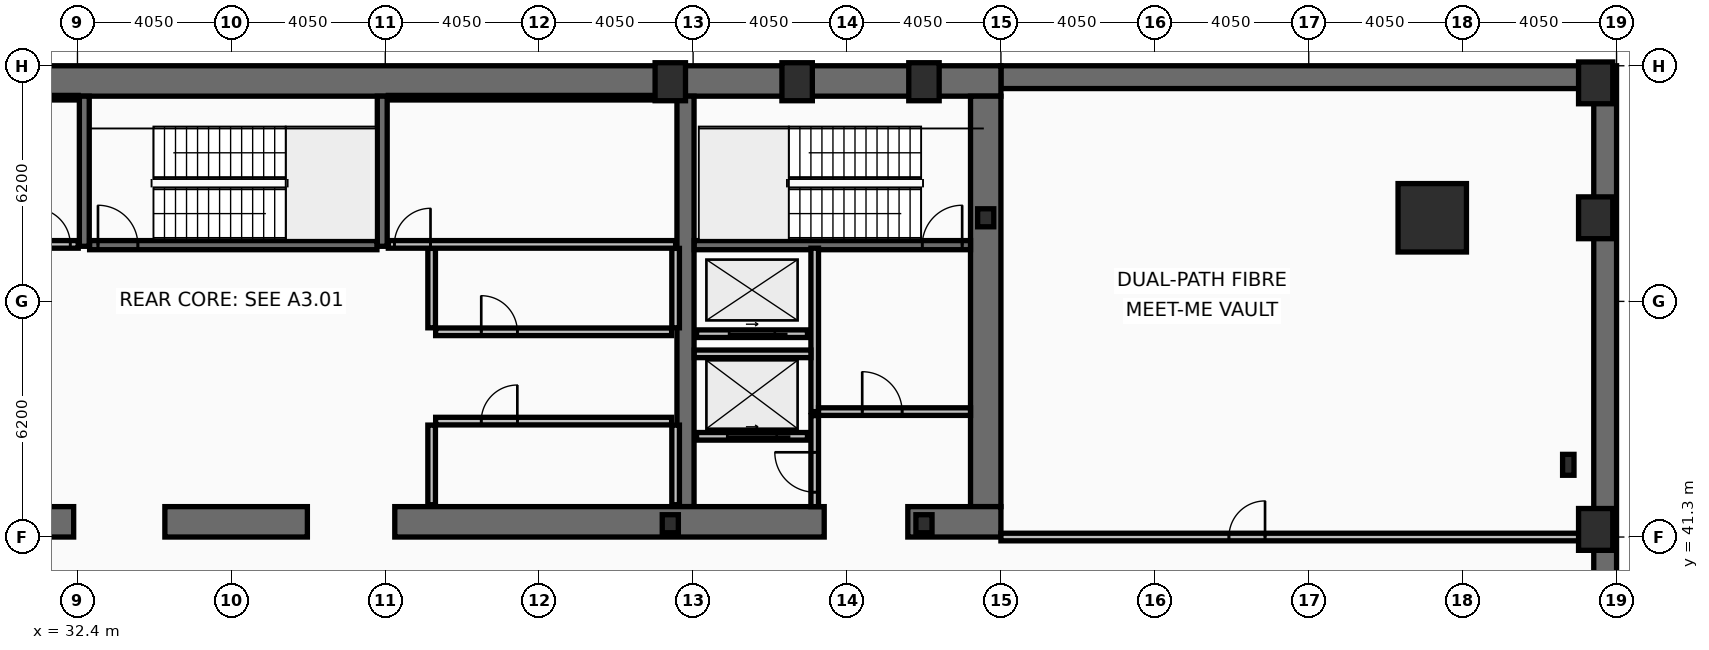
"""IFC4 building model, lengths in metres.
Left out: names, types, materials, properties, quantities, classifications, styles, units other than length and angle.
Written with IfcOpenShell. Run it as: python <this file> out.ifc"""

import sys

from ifc_helpers import new_model, si_unit, direction, frame, frame_2d, origin, origin_2d, place, context, subcontext, project, spatial, rectangle, hollow_rectangle, i_section, extrude, element, fill, save


model = new_model("IFC4")
c1 = context("Model", 3, precision=1e-05, world=origin(), true_north=direction((0.0, 1.0)))
c2 = subcontext(c1, "Body", "Model", "MODEL_VIEW")
j1 = project(units=[si_unit("LENGTHUNIT", "METRE"), si_unit("PLANEANGLEUNIT", "RADIAN")], contexts=[c1])
p1 = place(None, origin())
s1 = spatial("IfcSite", under=j1, at=p1, CompositionType="ELEMENT")
p2 = place(p1, origin())
s2 = spatial("IfcBuilding", under=s1, at=p2, CompositionType="ELEMENT")
p3 = place(p2, frame((0.0, 0.0, -9.0)))
s3 = spatial("IfcBuildingStorey", under=s2, at=p3, CompositionType="ELEMENT", Elevation=-9.0)
p4 = place(p3, frame((56.7, 53.4, -0.2), z_axis=(0.0, 0.0, 1.0), x_axis=(1.0, 0.0, 0.0)))
e1 = element("IfcWall", 1, at=p4, inside=s3, PredefinedType="SOLIDWALL", context=c2, shape_type="SweptSolid", body=[
    extrude(rectangle(XDim=15.6, YDim=0.6, at=frame_2d((7.8, 0.0))), origin(), (0.0, 0.0, 1.0), 4.48),
])
p5 = place(p3, frame((72.6, 53.7, -0.2), z_axis=(0.0, 0.0, 1.0), x_axis=(0.0, -1.0, 0.0)))
e2 = element("IfcWall", 2, at=p5, inside=s3, PredefinedType="SOLIDWALL", context=c2, shape_type="SweptSolid", body=[
    extrude(rectangle(XDim=53.7, YDim=0.6, at=frame_2d((26.85, 0.0))), origin(), (0.0, 0.0, 1.0), 4.48),
])
p6 = place(p3, frame((16.2, 53.3, -0.2), z_axis=(0.0, 0.0, 1.0), x_axis=(1.0, 0.0, 0.0)))
e3 = element("IfcWall", 3, at=p6, inside=s3, PredefinedType="SHEAR", context=c2, shape_type="SweptSolid", body=[
    extrude(rectangle(XDim=40.5, YDim=0.8, at=frame_2d((20.25, 0.0))), origin(), (0.0, 0.0, 1.0), 4.48),
])
p7 = place(p3, frame((56.3, 52.9, -0.2), z_axis=(0.0, 0.0, 1.0), x_axis=(0.0, -1.0, 0.0)))
e4 = element("IfcWall", 4, at=p7, inside=s3, PredefinedType="SHEAR", context=c2, shape_type="SweptSolid", body=[
    extrude(rectangle(XDim=10.8, YDim=0.8, at=frame_2d((5.4, 0.0))), origin(), (0.0, 0.0, 1.0), 4.48),
])
p8 = place(p3, frame((48.4, 42.1, -0.2), z_axis=(0.0, 0.0, 1.0), x_axis=(0.0, 1.0, 0.0)))
e5 = element("IfcWall", 5, at=p8, inside=s3, PredefinedType="SHEAR", context=c2, shape_type="SweptSolid", body=[
    extrude(rectangle(XDim=10.8, YDim=0.45, at=frame_2d((5.4, 0.0))), origin(), (0.0, 0.0, 1.0), 4.48),
])
p9 = place(p3, frame((32.3, 41.7, -0.2), z_axis=(0.0, 0.0, 1.0), x_axis=(-1.0, 0.0, 0.0)))
e6 = element("IfcWall", 6, at=p9, inside=s3, PredefinedType="SHEAR", context=c2, shape_type="SweptSolid", body=[
    extrude(rectangle(XDim=11.45, YDim=0.8, at=frame_2d((5.725, 0.0))), origin(), (0.0, 0.0, 1.0), 4.48),
])
p10 = place(p3, frame((38.45, 41.7, -0.2), z_axis=(0.0, 0.0, 1.0), x_axis=(-1.0, 0.0, 0.0)))
e7 = element("IfcWall", 7, at=p10, inside=s3, PredefinedType="SHEAR", context=c2, shape_type="SweptSolid", body=[
    extrude(rectangle(XDim=3.75, YDim=0.8, at=frame_2d((1.875, 0.0))), origin(), (0.0, 0.0, 1.0), 4.48),
])
p11 = place(p3, frame((52.05, 41.7, -0.2), z_axis=(0.0, 0.0, 1.0), x_axis=(-1.0, 0.0, 0.0)))
e8 = element("IfcWall", 8, at=p11, inside=s3, PredefinedType="SHEAR", context=c2, shape_type="SweptSolid", body=[
    extrude(rectangle(XDim=11.3, YDim=0.8, at=frame_2d((5.65, 0.0))), origin(), (0.0, 0.0, 1.0), 4.48),
])
p12 = place(p3, frame((56.7, 41.7, -0.2), z_axis=(0.0, 0.0, 1.0), x_axis=(-1.0, 0.0, 0.0)))
e9 = element("IfcWall", 9, at=p12, inside=s3, PredefinedType="SHEAR", context=c2, shape_type="SweptSolid", body=[
    extrude(rectangle(XDim=2.45, YDim=0.8, at=frame_2d((1.225, 0.0))), origin(), (0.0, 0.0, 1.0), 4.48),
])
for number, where, z_axis, x_axis in (
    (10, (32.58, 48.95, -0.2), (0.0, 0.0, 1.0), (0.0, 1.0, 0.0)),
    (11, (40.42, 48.95, -0.2), (0.0, 0.0, 1.0), (0.0, 1.0, 0.0)),
):
    element("IfcWall", number, at=place(p3, frame(where, z_axis=z_axis, x_axis=x_axis)), inside=s3, PredefinedType="SHEAR", context=c2, shape_type="SweptSolid", body=[
        extrude(rectangle(XDim=3.95, YDim=0.26, at=frame_2d((1.975, 0.0))), origin(), (0.0, 0.0, 1.0), 4.48),
    ])
p13 = place(p3, frame((48.63, 48.98, 0.0), z_axis=(0.0, 0.0, 1.0), x_axis=(1.0, 0.0, 0.0)))
e12 = element("IfcWall", 12, at=p13, inside=s3, PredefinedType="SHEAR", context=c2, shape_type="SweptSolid", body=[
    extrude(rectangle(XDim=7.27, YDim=0.24, at=frame_2d((3.635, 0.0))), origin(), (0.0, 0.0, 1.0), 4.28),
])
p14 = place(p13, frame((6.0, 0.0, 0.0)))
e13 = element("IfcOpeningElement", 13, at=p14, cuts=e12, PredefinedType="OPENING", context=c2, shape_type="SweptSolid", body=[
    extrude(rectangle(XDim=1.05, YDim=2.15, at=frame_2d((0.525, 1.075))), frame((0.0, 0.13, 0.0), z_axis=(0.0, -1.0, 0.0), x_axis=(1.0, 0.0, 0.0)), (0.0, 0.0, 1.0), 0.26),
])
p15 = place(p3, frame((32.72, 48.98, 0.0), z_axis=(0.0, 0.0, 1.0), x_axis=(1.0, 0.0, 0.0)))
e14 = element("IfcWall", 14, at=p15, inside=s3, PredefinedType="SHEAR", context=c2, shape_type="SweptSolid", body=[
    extrude(rectangle(XDim=7.56, YDim=0.24, at=frame_2d((3.78, 0.0))), origin(), (0.0, 0.0, 1.0), 4.28),
])
p16 = place(p15, frame((0.22, 0.0, 0.0)))
e15 = element("IfcOpeningElement", 15, at=p16, cuts=e14, PredefinedType="OPENING", context=c2, shape_type="SweptSolid", body=[
    extrude(rectangle(XDim=1.05, YDim=2.15, at=frame_2d((0.525, 1.075))), frame((0.0, 0.13, 0.0), z_axis=(0.0, -1.0, 0.0), x_axis=(1.0, 0.0, 0.0)), (0.0, 0.0, 1.0), 0.26),
])
p17 = place(p3, frame((68.05, 49.7, -0.2), z_axis=(0.0, 0.0, 1.0), x_axis=(1.0, 0.0, 0.0)))
e16 = element("IfcColumn", 16, at=p17, inside=s3, PredefinedType="COLUMN", context=c2, shape_type="SweptSolid", body=[
    extrude(hollow_rectangle(XDim=1.8, YDim=1.8, WallThickness=0.08, at=origin_2d()), origin(), (0.0, 0.0, 1.0), 4.7),
])
for number, where, z_axis, x_axis in (
    (17, (48.0, 53.28, -0.2), (0.0, 0.0, 1.0), (1.0, 0.0, 0.0)),
    (18, (51.337, 53.28, -0.2), (0.0, 0.0, 1.0), (1.0, 0.0, 0.0)),
    (19, (54.675, 53.28, -0.2), (0.0, 0.0, 1.0), (1.0, 0.0, 0.0)),
):
    element("IfcColumn", number, at=place(p3, frame(where, z_axis=z_axis, x_axis=x_axis)), inside=s3, PredefinedType="COLUMN", context=c2, shape_type="SweptSolid", body=[
        extrude(hollow_rectangle(XDim=0.8, YDim=1.0, WallThickness=0.055, at=origin_2d()), origin(), (0.0, 0.0, 1.0), 4.7),
    ])
p18 = place(p3, frame((71.63, 43.2, -0.2), z_axis=(0.0, 0.0, 1.0), x_axis=(1.0, 0.0, 0.0)))
e20 = element("IfcColumn", 20, at=p18, inside=s3, PredefinedType="COLUMN", context=c2, shape_type="SweptSolid", body=[
    extrude(i_section(OverallWidth=0.3, OverallDepth=0.55, WebThickness=0.015, FlangeThickness=0.029, at=origin_2d()), origin(), (0.0, 0.0, 1.0), 4.7),
])
for number, where, z_axis, x_axis in (
    (21, (56.3, 49.7, -0.2), (0.0, 0.0, 1.0), (1.0, 0.0, 0.0)),
    (22, (48.0, 41.65, -0.2), (0.0, 0.0, 1.0), (1.0, 0.0, 0.0)),
    (23, (54.675, 41.65, -0.2), (0.0, 0.0, 1.0), (1.0, 0.0, 0.0)),
):
    element("IfcColumn", number, at=place(p3, frame(where, z_axis=z_axis, x_axis=x_axis)), inside=s3, PredefinedType="COLUMN", context=c2, shape_type="SweptSolid", body=[
        extrude(i_section(OverallWidth=0.424, OverallDepth=0.474, WebThickness=0.048, FlangeThickness=0.077, at=origin_2d()), origin(), (0.0, 0.0, 1.0), 4.7),
    ])
for number, where, z_axis, x_axis in (
    (24, (72.35, 49.7, -0.2), (0.0, 0.0, 1.0), (1.0, 0.0, 0.0)),
    (25, (72.35, 53.25, -0.2), (0.0, 0.0, 1.0), (1.0, 0.0, 0.0)),
    (26, (72.35, 41.5, -0.2), (0.0, 0.0, 1.0), (1.0, 0.0, 0.0)),
):
    element("IfcColumn", number, at=place(p3, frame(where, z_axis=z_axis, x_axis=x_axis)), inside=s3, PredefinedType="PILASTER", context=c2, shape_type="SweptSolid", body=[
        extrude(rectangle(XDim=0.9, YDim=1.1, at=origin_2d()), origin(), (0.0, 0.0, 1.0), 4.7),
    ])
p19 = place(p3, frame((51.61, 43.95, 0.0), z_axis=(0.0, 0.0, 1.0), x_axis=(-1.0, 0.0, 0.0)))
e27 = element("IfcWall", 27, at=p19, inside=s3, PredefinedType="PARTITIONING", context=c2, shape_type="SweptSolid", body=[
    extrude(rectangle(XDim=2.92, YDim=0.2, at=frame_2d((1.46, 0.0))), origin(), (0.0, 0.0, 1.0), 4.28),
])
p20 = place(p19, frame((0.81, 0.0, 0.0)))
e28 = element("IfcOpeningElement", 28, at=p20, cuts=e27, PredefinedType="OPENING", context=c2, shape_type="SweptSolid", body=[
    extrude(rectangle(XDim=1.3, YDim=2.18, at=frame_2d((0.65, 1.09))), frame((0.0, 0.11, 0.0), z_axis=(0.0, -1.0, 0.0), x_axis=(1.0, 0.0, 0.0)), (0.0, 0.0, 1.0), 0.22),
])
p21 = place(p3, frame((51.61, 46.65, 0.0), z_axis=(0.0, 0.0, 1.0), x_axis=(-1.0, 0.0, 0.0)))
e29 = element("IfcWall", 29, at=p21, inside=s3, PredefinedType="PARTITIONING", context=c2, shape_type="SweptSolid", body=[
    extrude(rectangle(XDim=2.92, YDim=0.2, at=frame_2d((1.46, 0.0))), origin(), (0.0, 0.0, 1.0), 4.28),
])
p22 = place(p21, frame((0.86, 0.0, 0.0)))
e30 = element("IfcOpeningElement", 30, at=p22, cuts=e29, PredefinedType="OPENING", context=c2, shape_type="SweptSolid", body=[
    extrude(rectangle(XDim=1.2, YDim=2.18, at=frame_2d((0.6, 1.09))), frame((0.0, 0.11, 0.0), z_axis=(0.0, -1.0, 0.0), x_axis=(1.0, 0.0, 0.0)), (0.0, 0.0, 1.0), 0.22),
])
p23 = place(p3, frame((51.8, 44.6, 0.0), z_axis=(0.0, 0.0, 1.0), x_axis=(0.0, 1.0, 0.0)))
e31 = element("IfcWall", 31, at=p23, inside=s3, PredefinedType="PARTITIONING", context=c2, shape_type="SweptSolid", body=[
    extrude(rectangle(XDim=4.3, YDim=0.2, at=frame_2d((2.15, 0.0))), origin(), (0.0, 0.0, 1.0), 4.28),
])
p24 = place(p3, frame((51.9, 44.6, 0.0), z_axis=(0.0, 0.0, 1.0), x_axis=(1.0, 0.0, 0.0)))
e32 = element("IfcWall", 32, at=p24, inside=s3, PredefinedType="PARTITIONING", context=c2, shape_type="SweptSolid", body=[
    extrude(rectangle(XDim=4.0, YDim=0.2, at=frame_2d((2.0, 0.0))), origin(), (0.0, 0.0, 1.0), 4.28),
])
p25 = place(p24, frame((1.15, 0.0, 0.0)))
e33 = element("IfcOpeningElement", 33, at=p25, cuts=e32, PredefinedType="OPENING", context=c2, shape_type="SweptSolid", body=[
    extrude(rectangle(XDim=1.05, YDim=2.15, at=frame_2d((0.525, 1.075))), frame((0.0, 0.11, 0.0), z_axis=(0.0, -1.0, 0.0), x_axis=(1.0, 0.0, 0.0)), (0.0, 0.0, 1.0), 0.22),
])
p26 = place(p3, frame((48.63, 46.12, 0.0), z_axis=(0.0, 0.0, 1.0), x_axis=(1.0, 0.0, 0.0)))
e34 = element("IfcWall", 34, at=p26, inside=s3, PredefinedType="PARTITIONING", context=c2, shape_type="SweptSolid", body=[
    extrude(rectangle(XDim=3.07, YDim=0.2, at=frame_2d((1.535, 0.0))), origin(), (0.0, 0.0, 1.0), 4.28),
])
p27 = place(p3, frame((51.8, 42.1, 0.0), z_axis=(0.0, 0.0, 1.0), x_axis=(0.0, 1.0, 0.0)))
e35 = element("IfcWall", 35, at=p27, inside=s3, PredefinedType="PARTITIONING", context=c2, shape_type="SweptSolid", body=[
    extrude(rectangle(XDim=2.395, YDim=0.2, at=frame_2d((1.198, 0.0))), origin(), (0.0, 0.0, 1.0), 4.28),
])
p28 = place(p27, frame((0.38, 0.0, 0.0)))
e36 = element("IfcOpeningElement", 36, at=p28, cuts=e35, PredefinedType="OPENING", context=c2, shape_type="SweptSolid", body=[
    extrude(rectangle(XDim=1.05, YDim=2.15, at=frame_2d((0.525, 1.075))), frame((0.0, 0.11, 0.0), z_axis=(0.0, -1.0, 0.0), x_axis=(1.0, 0.0, 0.0)), (0.0, 0.0, 1.0), 0.22),
])
for number, where, z_axis, x_axis in (
    (37, (41.72, 46.805, 0.0), (0.0, 0.0, 1.0), (0.0, 1.0, 0.0)),
    (38, (48.14, 46.805, 0.0), (0.0, 0.0, 1.0), (0.0, 1.0, 0.0)),
):
    element("IfcWall", number, at=place(p3, frame(where, z_axis=z_axis, x_axis=x_axis)), inside=s3, PredefinedType="PARTITIONING", context=c2, shape_type="SweptSolid", body=[
        extrude(rectangle(XDim=2.09, YDim=0.2, at=frame_2d((1.045, 0.0))), origin(), (0.0, 0.0, 1.0), 4.28),
    ])
p29 = place(p3, frame((41.825, 46.7, 0.0), z_axis=(0.0, 0.0, 1.0), x_axis=(1.0, 0.0, 0.0)))
e39 = element("IfcWall", 39, at=p29, inside=s3, PredefinedType="PARTITIONING", context=c2, shape_type="SweptSolid", body=[
    extrude(rectangle(XDim=6.21, YDim=0.2, at=frame_2d((3.105, 0.0))), origin(), (0.0, 0.0, 1.0), 4.28),
])
p30 = place(p29, frame((1.2, 0.0, 0.0)))
e40 = element("IfcOpeningElement", 40, at=p30, cuts=e39, PredefinedType="OPENING", context=c2, shape_type="SweptSolid", body=[
    extrude(rectangle(XDim=0.95, YDim=2.1, at=frame_2d((0.475, 1.05))), frame((0.0, 0.11, 0.0), z_axis=(0.0, -1.0, 0.0), x_axis=(1.0, 0.0, 0.0)), (0.0, 0.0, 1.0), 0.22),
])
for number, where, z_axis, x_axis in (
    (41, (41.72, 42.15, 0.0), (0.0, 0.0, 1.0), (0.0, 1.0, 0.0)),
    (42, (48.14, 42.15, 0.0), (0.0, 0.0, 1.0), (0.0, 1.0, 0.0)),
):
    element("IfcWall", number, at=place(p3, frame(where, z_axis=z_axis, x_axis=x_axis)), inside=s3, PredefinedType="PARTITIONING", context=c2, shape_type="SweptSolid", body=[
        extrude(rectangle(XDim=2.095, YDim=0.2, at=frame_2d((1.048, 0.0))), origin(), (0.0, 0.0, 1.0), 4.28),
    ])
p31 = place(p3, frame((41.825, 44.35, 0.0), z_axis=(0.0, 0.0, 1.0), x_axis=(1.0, 0.0, 0.0)))
e43 = element("IfcWall", 43, at=p31, inside=s3, PredefinedType="PARTITIONING", context=c2, shape_type="SweptSolid", body=[
    extrude(rectangle(XDim=6.21, YDim=0.2, at=frame_2d((3.105, 0.0))), origin(), (0.0, 0.0, 1.0), 4.28),
])
p32 = place(p31, frame((1.2, 0.0, 0.0)))
e44 = element("IfcOpeningElement", 44, at=p32, cuts=e43, PredefinedType="OPENING", context=c2, shape_type="SweptSolid", body=[
    extrude(rectangle(XDim=0.95, YDim=2.1, at=frame_2d((0.475, 1.05))), frame((0.0, 0.11, 0.0), z_axis=(0.0, -1.0, 0.0), x_axis=(1.0, 0.0, 0.0)), (0.0, 0.0, 1.0), 0.22),
])
p33 = place(p3, frame((24.7, 52.86, 0.0), z_axis=(0.0, 0.0, 1.0), x_axis=(1.0, 0.0, 0.0)))
e45 = element("IfcWall", 45, at=p33, inside=s3, PredefinedType="PARTITIONING", context=c2, shape_type="SweptSolid", body=[
    extrude(rectangle(XDim=7.72, YDim=0.12, at=frame_2d((3.86, 0.0))), origin(), (0.0, 0.0, 1.0), 4.28),
])
p34 = place(p3, frame((24.7, 49.0, 0.0), z_axis=(0.0, 0.0, 1.0), x_axis=(1.0, 0.0, 0.0)))
e46 = element("IfcWall", 46, at=p34, inside=s3, PredefinedType="PARTITIONING", context=c2, shape_type="SweptSolid", body=[
    extrude(rectangle(XDim=7.72, YDim=0.2, at=frame_2d((3.86, 0.0))), origin(), (0.0, 0.0, 1.0), 4.28),
])
p35 = place(p34, frame((6.56, 0.0, 0.0)))
e47 = element("IfcOpeningElement", 47, at=p35, cuts=e46, PredefinedType="OPENING", context=c2, shape_type="SweptSolid", body=[
    extrude(rectangle(XDim=0.95, YDim=2.1, at=frame_2d((0.475, 1.05))), frame((0.0, 0.11, 0.0), z_axis=(0.0, -1.0, 0.0), x_axis=(1.0, 0.0, 0.0)), (0.0, 0.0, 1.0), 0.22),
])
p36 = place(p3, frame((40.58, 52.86, 0.0), z_axis=(0.0, 0.0, 1.0), x_axis=(1.0, 0.0, 0.0)))
e48 = element("IfcWall", 48, at=p36, inside=s3, PredefinedType="PARTITIONING", context=c2, shape_type="SweptSolid", body=[
    extrude(rectangle(XDim=7.56, YDim=0.12, at=frame_2d((3.78, 0.0))), origin(), (0.0, 0.0, 1.0), 4.28),
])
p37 = place(p3, frame((40.58, 49.0, 0.0), z_axis=(0.0, 0.0, 1.0), x_axis=(1.0, 0.0, 0.0)))
e49 = element("IfcWall", 49, at=p37, inside=s3, PredefinedType="PARTITIONING", context=c2, shape_type="SweptSolid", body=[
    extrude(rectangle(XDim=7.56, YDim=0.2, at=frame_2d((3.78, 0.0))), origin(), (0.0, 0.0, 1.0), 4.28),
])
p38 = place(p37, frame((0.16, 0.0, 0.0)))
e50 = element("IfcOpeningElement", 50, at=p38, cuts=e49, PredefinedType="OPENING", context=c2, shape_type="SweptSolid", body=[
    extrude(rectangle(XDim=0.95, YDim=2.1, at=frame_2d((0.475, 1.05))), frame((0.0, 0.11, 0.0), z_axis=(0.0, -1.0, 0.0), x_axis=(1.0, 0.0, 0.0)), (0.0, 0.0, 1.0), 0.22),
])
p39 = place(p3, frame((56.7, 41.3, 0.0), z_axis=(0.0, 0.0, 1.0), x_axis=(1.0, 0.0, 0.0)))
e51 = element("IfcWall", 51, at=p39, inside=s3, PredefinedType="PARTITIONING", context=c2, shape_type="SweptSolid", body=[
    extrude(rectangle(XDim=15.6, YDim=0.2, at=frame_2d((7.8, 0.0))), origin(), (0.0, 0.0, 1.0), 3.62),
])
p40 = place(p39, frame((6.0, 0.0, 0.0)))
e52 = element("IfcOpeningElement", 52, at=p40, cuts=e51, PredefinedType="OPENING", context=c2, shape_type="SweptSolid", body=[
    extrude(rectangle(XDim=0.95, YDim=2.1, at=frame_2d((0.475, 1.05))), frame((0.0, 0.11, 0.0), z_axis=(0.0, -1.0, 0.0), x_axis=(1.0, 0.0, 0.0)), (0.0, 0.0, 1.0), 0.22),
])
p41 = place(p14, origin())
e53 = element("IfcDoor", 53, at=p41, inside=s3, OperationType="SINGLE_SWING_RIGHT", PredefinedType="DOOR", context=c2, shape_type="SweptSolid", body=[
    extrude(rectangle(XDim=1.05, YDim=2.15, at=frame_2d((0.525, 1.075))), frame((0.0, 0.025, 0.0), z_axis=(0.0, -1.0, 0.0), x_axis=(1.0, 0.0, 0.0)), (0.0, 0.0, 1.0), 0.05),
])
fill(e13, e53)
p42 = place(p16, origin())
e54 = element("IfcDoor", 54, at=p42, inside=s3, OperationType="SINGLE_SWING_LEFT", PredefinedType="DOOR", context=c2, shape_type="SweptSolid", body=[
    extrude(rectangle(XDim=1.05, YDim=2.15, at=frame_2d((0.525, 1.075))), frame((0.0, 0.025, 0.0), z_axis=(0.0, -1.0, 0.0), x_axis=(1.0, 0.0, 0.0)), (0.0, 0.0, 1.0), 0.05),
])
fill(e15, e54)
p43 = place(p20, origin())
e55 = element("IfcDoor", 55, at=p43, inside=s3, OperationType="SLIDING_TO_LEFT", PredefinedType="DOOR", context=c2, shape_type="SweptSolid", body=[
    extrude(rectangle(XDim=1.3, YDim=2.18, at=frame_2d((0.65, 1.09))), frame((0.0, 0.025, 0.0), z_axis=(0.0, -1.0, 0.0), x_axis=(1.0, 0.0, 0.0)), (0.0, 0.0, 1.0), 0.05),
])
fill(e28, e55)
p44 = place(p22, origin())
e56 = element("IfcDoor", 56, at=p44, inside=s3, OperationType="SLIDING_TO_LEFT", PredefinedType="DOOR", context=c2, shape_type="SweptSolid", body=[
    extrude(rectangle(XDim=1.2, YDim=2.18, at=frame_2d((0.6, 1.09))), frame((0.0, 0.025, 0.0), z_axis=(0.0, -1.0, 0.0), x_axis=(1.0, 0.0, 0.0)), (0.0, 0.0, 1.0), 0.05),
])
fill(e30, e56)
p45 = place(p25, origin())
e57 = element("IfcDoor", 57, at=p45, inside=s3, OperationType="SINGLE_SWING_LEFT", PredefinedType="DOOR", context=c2, shape_type="SweptSolid", body=[
    extrude(rectangle(XDim=1.05, YDim=2.15, at=frame_2d((0.525, 1.075))), frame((0.0, 0.025, 0.0), z_axis=(0.0, -1.0, 0.0), x_axis=(1.0, 0.0, 0.0)), (0.0, 0.0, 1.0), 0.05),
])
fill(e33, e57)
p46 = place(p28, origin())
e58 = element("IfcDoor", 58, at=p46, inside=s3, OperationType="SINGLE_SWING_RIGHT", PredefinedType="DOOR", context=c2, shape_type="SweptSolid", body=[
    extrude(rectangle(XDim=1.05, YDim=2.15, at=frame_2d((0.525, 1.075))), frame((0.0, 0.025, 0.0), z_axis=(0.0, -1.0, 0.0), x_axis=(1.0, 0.0, 0.0)), (0.0, 0.0, 1.0), 0.05),
])
fill(e36, e58)
p47 = place(p30, origin())
e59 = element("IfcDoor", 59, at=p47, inside=s3, OperationType="SINGLE_SWING_LEFT", PredefinedType="DOOR", context=c2, shape_type="SweptSolid", body=[
    extrude(rectangle(XDim=0.95, YDim=2.1, at=frame_2d((0.475, 1.05))), frame((0.0, 0.025, 0.0), z_axis=(0.0, -1.0, 0.0), x_axis=(1.0, 0.0, 0.0)), (0.0, 0.0, 1.0), 0.05),
])
fill(e40, e59)
p48 = place(p32, origin())
e60 = element("IfcDoor", 60, at=p48, inside=s3, OperationType="SINGLE_SWING_RIGHT", PredefinedType="DOOR", context=c2, shape_type="SweptSolid", body=[
    extrude(rectangle(XDim=0.95, YDim=2.1, at=frame_2d((0.475, 1.05))), frame((0.0, 0.025, 0.0), z_axis=(0.0, -1.0, 0.0), x_axis=(1.0, 0.0, 0.0)), (0.0, 0.0, 1.0), 0.05),
])
fill(e44, e60)
p49 = place(p35, origin())
e61 = element("IfcDoor", 61, at=p49, inside=s3, OperationType="SINGLE_SWING_LEFT", PredefinedType="DOOR", context=c2, shape_type="SweptSolid", body=[
    extrude(rectangle(XDim=0.95, YDim=2.1, at=frame_2d((0.475, 1.05))), frame((0.0, 0.025, 0.0), z_axis=(0.0, -1.0, 0.0), x_axis=(1.0, 0.0, 0.0)), (0.0, 0.0, 1.0), 0.05),
])
fill(e47, e61)
p50 = place(p38, origin())
e62 = element("IfcDoor", 62, at=p50, inside=s3, OperationType="SINGLE_SWING_RIGHT", PredefinedType="DOOR", context=c2, shape_type="SweptSolid", body=[
    extrude(rectangle(XDim=0.95, YDim=2.1, at=frame_2d((0.475, 1.05))), frame((0.0, 0.025, 0.0), z_axis=(0.0, -1.0, 0.0), x_axis=(1.0, 0.0, 0.0)), (0.0, 0.0, 1.0), 0.05),
])
fill(e50, e62)
p51 = place(p40, origin())
e63 = element("IfcDoor", 63, at=p51, inside=s3, OperationType="SINGLE_SWING_RIGHT", PredefinedType="DOOR", context=c2, shape_type="SweptSolid", body=[
    extrude(rectangle(XDim=0.95, YDim=2.1, at=frame_2d((0.475, 1.05))), frame((0.0, 0.025, 0.0), z_axis=(0.0, -1.0, 0.0), x_axis=(1.0, 0.0, 0.0)), (0.0, 0.0, 1.0), 0.05),
])
fill(e52, e63)
save(model, sys.argv[1])
